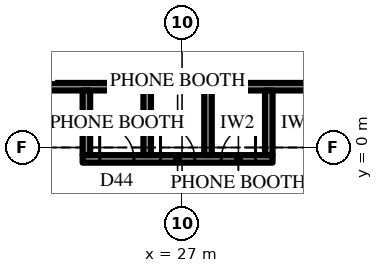
"""IFC4 building model, lengths in metres.
Left out: names, types, materials, properties, quantities, classifications, styles, units other than length and angle.
Written with IfcOpenShell. Run it as: python <this file> out.ifc"""

import sys

from ifc_helpers import new_model, si_unit, direction, frame, frame_2d, origin, place, context, subcontext, project, spatial, rectangle, extrude, element, fill, save


model = new_model("IFC4")
c1 = context("Model", 3, precision=1e-05, world=origin(), true_north=direction((0.0, 1.0)))
c2 = subcontext(c1, "Body", "Model", "MODEL_VIEW")
j1 = project(units=[si_unit("LENGTHUNIT", "METRE"), si_unit("PLANEANGLEUNIT", "RADIAN")], contexts=[c1])
p1 = place(None, origin())
s1 = spatial("IfcSite", under=j1, at=p1, CompositionType="ELEMENT")
p2 = place(p1, origin())
s2 = spatial("IfcBuilding", under=s1, at=p2, CompositionType="ELEMENT")
p3 = place(p2, frame((0.0, 0.0, 161.5)))
s3 = spatial("IfcBuildingStorey", under=s2, at=p3, CompositionType="ELEMENT", Elevation=161.5)
p4 = place(p3, frame((18.6, 1.6, 0.0), z_axis=(0.0, 0.0, 1.0), x_axis=(1.0, 0.0, 0.0)))
e1 = element("IfcWall", 1, at=p4, inside=s3, PredefinedType="PARTITIONING", context=c2, shape_type="SweptSolid", body=[
    extrude(rectangle(XDim=15.059, YDim=0.2, at=frame_2d((7.53, 0.0))), origin(), (0.0, 0.0, 1.0), 4.0),
])
p5 = place(p4, frame((1.006, 0.0, 0.0)))
e2 = element("IfcOpeningElement", 2, at=p5, cuts=e1, PredefinedType="OPENING", context=c2, shape_type="SweptSolid", body=[
    extrude(rectangle(XDim=1.0, YDim=2.2, at=frame_2d((0.5, 1.1))), frame((0.0, 0.11, 0.0), z_axis=(0.0, -1.0, 0.0), x_axis=(1.0, 0.0, 0.0)), (0.0, 0.0, 1.0), 0.22),
])
p6 = place(p3, frame((24.383, -0.3, 0.0), z_axis=(0.0, 0.0, 1.0), x_axis=(1.0, 0.0, 0.0)))
e3 = element("IfcWall", 3, at=p6, inside=s3, PredefinedType="PARTITIONING", context=c2, shape_type="SweptSolid", body=[
    extrude(rectangle(XDim=5.0, YDim=0.2, at=frame_2d((2.5, 0.0))), origin(), (0.0, 0.0, 1.0), 4.0),
])
p7 = place(p6, frame((0.45, 0.0, 0.0)))
e4 = element("IfcOpeningElement", 4, at=p7, cuts=e3, PredefinedType="OPENING", context=c2, shape_type="SweptSolid", body=[
    extrude(rectangle(XDim=0.9, YDim=2.2, at=frame_2d((0.45, 1.1))), frame((0.0, 0.11, 0.0), z_axis=(0.0, -1.0, 0.0), x_axis=(1.0, 0.0, 0.0)), (0.0, 0.0, 1.0), 0.22),
])
p8 = place(p6, frame((2.05, 0.0, 0.0)))
e5 = element("IfcOpeningElement", 5, at=p8, cuts=e3, PredefinedType="OPENING", context=c2, shape_type="SweptSolid", body=[
    extrude(rectangle(XDim=0.9, YDim=2.2, at=frame_2d((0.45, 1.1))), frame((0.0, 0.11, 0.0), z_axis=(0.0, -1.0, 0.0), x_axis=(1.0, 0.0, 0.0)), (0.0, 0.0, 1.0), 0.22),
])
p9 = place(p6, frame((3.65, 0.0, 0.0)))
e6 = element("IfcOpeningElement", 6, at=p9, cuts=e3, PredefinedType="OPENING", context=c2, shape_type="SweptSolid", body=[
    extrude(rectangle(XDim=0.9, YDim=2.2, at=frame_2d((0.45, 1.1))), frame((0.0, 0.11, 0.0), z_axis=(0.0, -1.0, 0.0), x_axis=(1.0, 0.0, 0.0)), (0.0, 0.0, 1.0), 0.22),
])
for number, where, z_axis, x_axis in (
    (7, (24.483, 1.5, 0.0), (0.0, 0.0, 1.0), (0.0, -1.0, 0.0)),
    (8, (26.083, 1.5, 0.0), (0.0, 0.0, 1.0), (0.0, -1.0, 0.0)),
    (9, (27.683, 1.5, 0.0), (0.0, 0.0, 1.0), (0.0, -1.0, 0.0)),
    (10, (29.283, 1.5, 0.0), (0.0, 0.0, 1.0), (0.0, -1.0, 0.0)),
):
    element("IfcWall", number, at=place(p3, frame(where, z_axis=z_axis, x_axis=x_axis)), inside=s3, PredefinedType="PARTITIONING", context=c2, shape_type="SweptSolid", body=[
        extrude(rectangle(XDim=1.7, YDim=0.2, at=frame_2d((0.85, 0.0))), origin(), (0.0, 0.0, 1.0), 4.0),
    ])
p10 = place(p7, origin())
e11 = element("IfcDoor", 11, at=p10, inside=s3, OperationType="SINGLE_SWING_RIGHT", PredefinedType="DOOR", context=c2, shape_type="SweptSolid", body=[
    extrude(rectangle(XDim=0.9, YDim=2.2, at=frame_2d((0.45, 1.1))), frame((0.0, 0.025, 0.0), z_axis=(0.0, -1.0, 0.0), x_axis=(1.0, 0.0, 0.0)), (0.0, 0.0, 1.0), 0.05),
])
fill(e4, e11)
p11 = place(p8, origin())
e12 = element("IfcDoor", 12, at=p11, inside=s3, OperationType="SINGLE_SWING_RIGHT", PredefinedType="DOOR", context=c2, shape_type="SweptSolid", body=[
    extrude(rectangle(XDim=0.9, YDim=2.2, at=frame_2d((0.45, 1.1))), frame((0.0, 0.025, 0.0), z_axis=(0.0, -1.0, 0.0), x_axis=(1.0, 0.0, 0.0)), (0.0, 0.0, 1.0), 0.05),
])
fill(e5, e12)
p12 = place(p9, origin())
e13 = element("IfcDoor", 13, at=p12, inside=s3, OperationType="SINGLE_SWING_LEFT", PredefinedType="DOOR", context=c2, shape_type="SweptSolid", body=[
    extrude(rectangle(XDim=0.9, YDim=2.2, at=frame_2d((0.45, 1.1))), frame((0.0, 0.025, 0.0), z_axis=(0.0, -1.0, 0.0), x_axis=(1.0, 0.0, 0.0)), (0.0, 0.0, 1.0), 0.05),
])
fill(e6, e13)
save(model, sys.argv[1])
